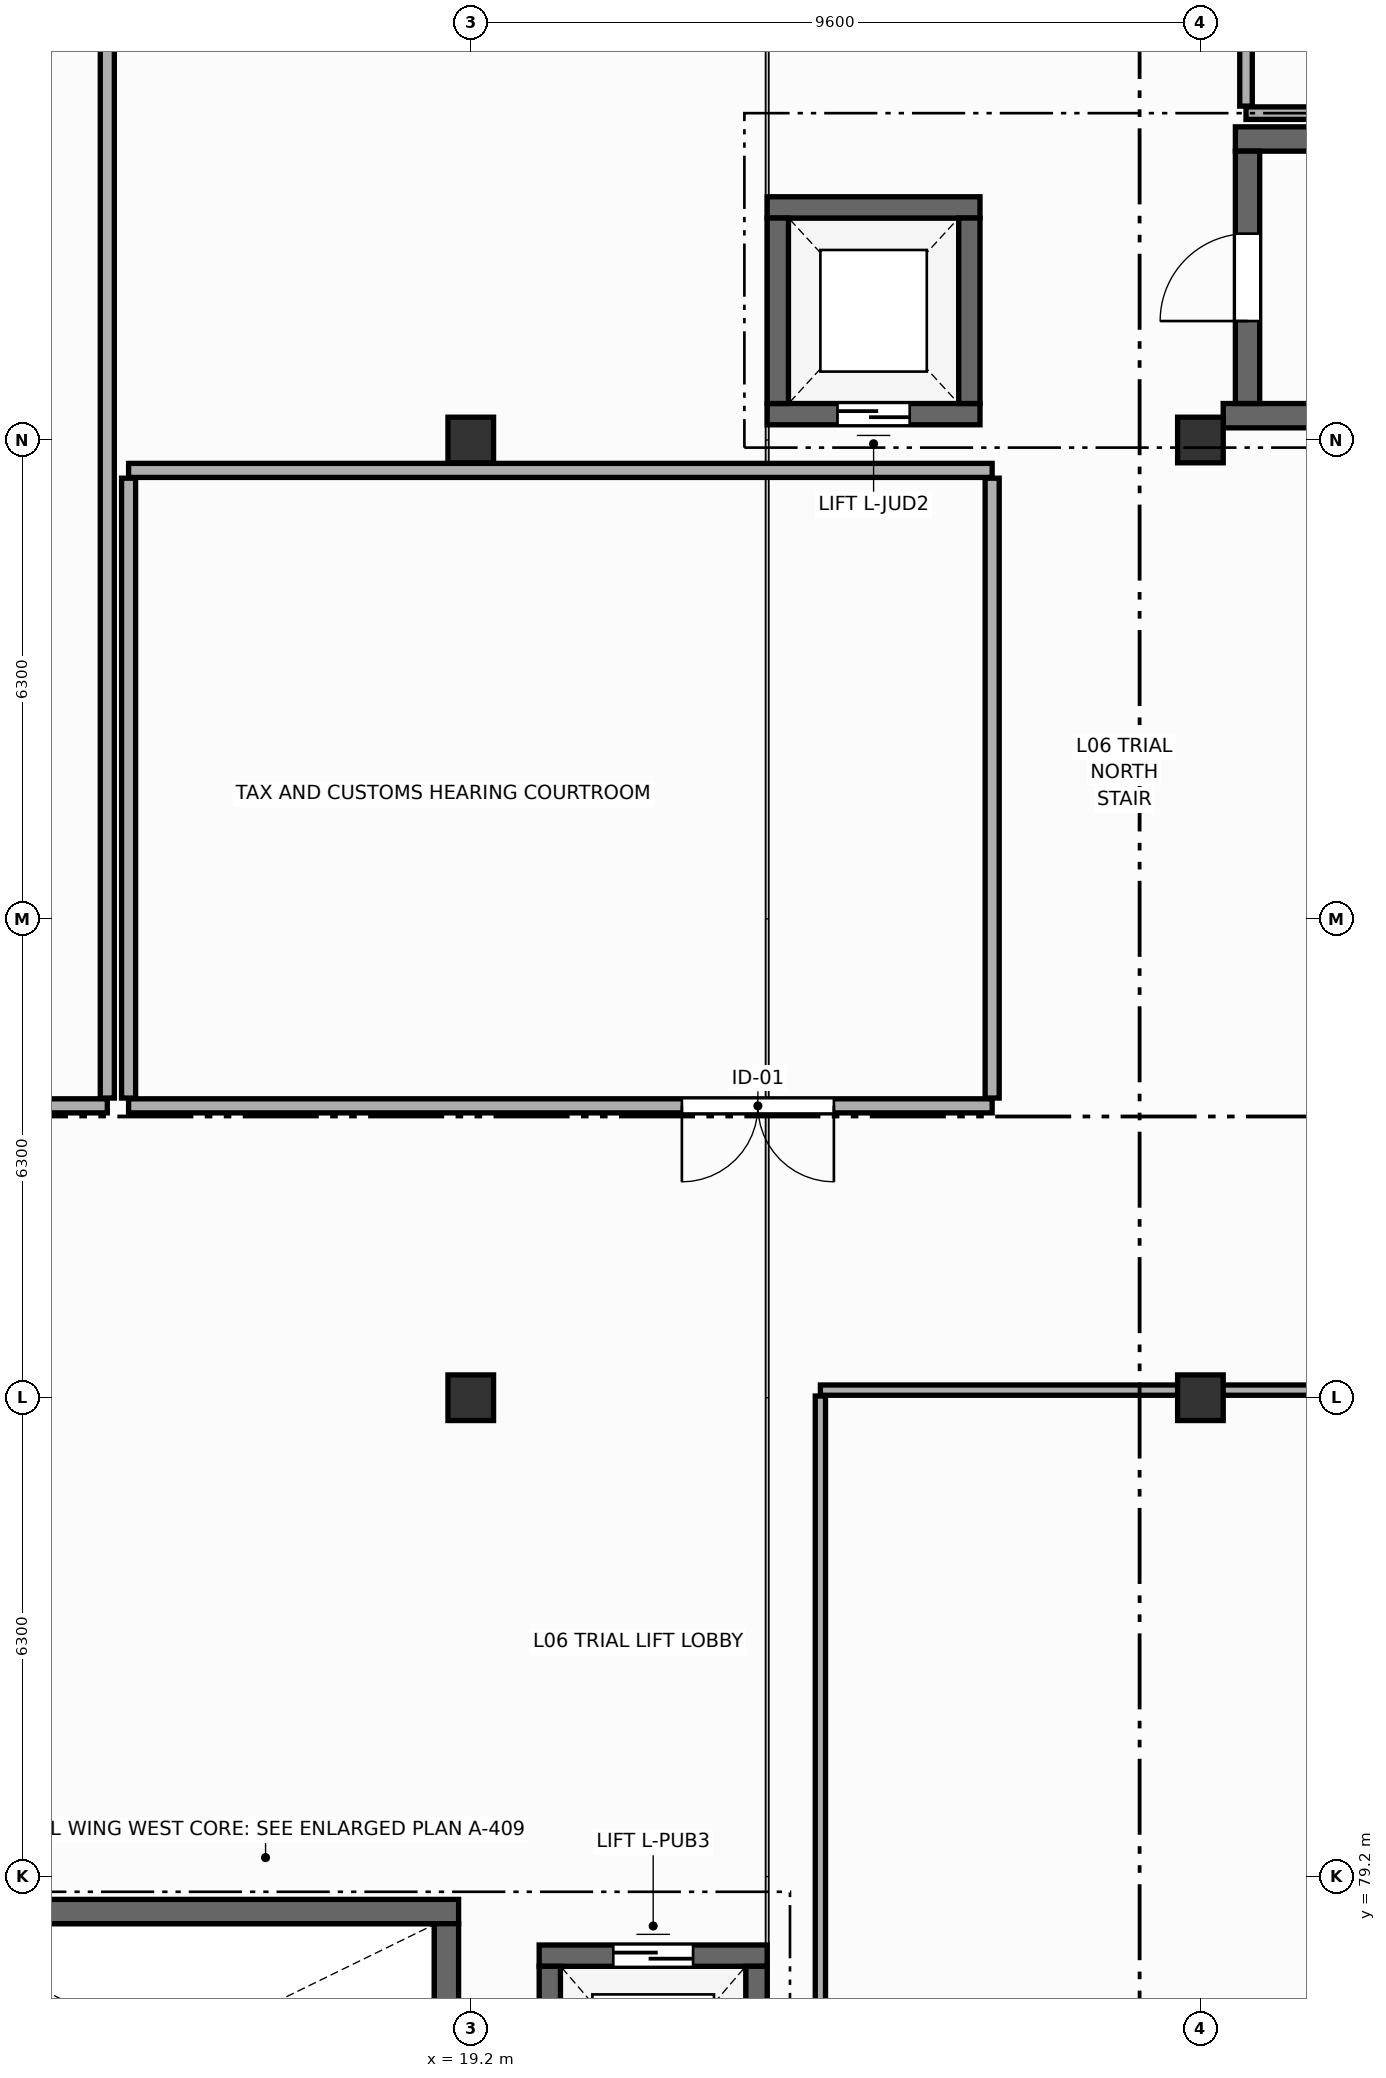
"""IFC4 building model, lengths in metres.
Left out: names, types, materials, properties, quantities, classifications, styles, units other than length and angle.
Written with IfcOpenShell. Run it as: python <this file> out.ifc"""

import sys

from ifc_helpers import new_model, si_unit, direction, frame, frame_2d, origin, origin_2d, place, context, subcontext, project, spatial, rectangle, extrude, element, fill, save


model = new_model("IFC4")
c1 = context("Model", 3, precision=1e-05, world=origin(), true_north=direction((0.0, 1.0)))
c2 = subcontext(c1, "Body", "Model", "MODEL_VIEW")
j1 = project(units=[si_unit("LENGTHUNIT", "METRE"), si_unit("PLANEANGLEUNIT", "RADIAN")], contexts=[c1])
p1 = place(None, origin())
s1 = spatial("IfcSite", under=j1, at=p1, CompositionType="ELEMENT")
p2 = place(p1, origin())
s2 = spatial("IfcBuilding", under=s1, at=p2, CompositionType="ELEMENT")
p3 = place(p2, frame((0.0, 0.0, 22.8)))
s3 = spatial("IfcBuildingStorey", under=s2, at=p3, CompositionType="ELEMENT", Elevation=22.8)
for number, where, z_axis, x_axis in (
    (1, (19.2, 85.5, 0.0), (0.0, 0.0, 1.0), (1.0, 0.0, 0.0)),
    (2, (19.2, 98.1, 0.0), (0.0, 0.0, 1.0), (1.0, 0.0, 0.0)),
    (3, (28.8, 85.5, 0.0), (0.0, 0.0, 1.0), (1.0, 0.0, 0.0)),
    (4, (28.8, 98.1, 0.0), (0.0, 0.0, 1.0), (1.0, 0.0, 0.0)),
):
    element("IfcColumn", number, at=place(p3, frame(where, z_axis=z_axis, x_axis=x_axis)), inside=s3, PredefinedType="COLUMN", context=c2, shape_type="SweptSolid", body=[
        extrude(rectangle(XDim=0.6, YDim=0.6, at=origin_2d()), origin(), (0.0, 0.0, 1.0), 4.2),
    ])
p4 = place(p3, frame((9.86, 78.74, 0.0), z_axis=(0.0, 0.0, 1.0), x_axis=(1.0, 0.0, 0.0)))
e5 = element("IfcWall", 5, at=p4, inside=s3, PredefinedType="SHEAR", context=c2, shape_type="SweptSolid", body=[
    extrude(rectangle(XDim=9.18, YDim=0.32, at=frame_2d((4.59, 0.0))), origin(), (0.0, 0.0, 1.0), 3.97),
])
p5 = place(p3, frame((18.88, 78.58, 0.0), z_axis=(0.0, 0.0, 1.0), x_axis=(0.0, -1.0, 0.0)))
e6 = element("IfcWall", 6, at=p5, inside=s3, PredefinedType="SHEAR", context=c2, shape_type="SweptSolid", body=[
    extrude(rectangle(XDim=3.4, YDim=0.32, at=frame_2d((1.7, 0.0))), origin(), (0.0, 0.0, 1.0), 3.97),
])
p6 = place(p3, frame((29.26, 102.06, 0.0), z_axis=(0.0, 0.0, 1.0), x_axis=(1.0, 0.0, 0.0)))
e7 = element("IfcWall", 7, at=p6, inside=s3, PredefinedType="SHEAR", context=c2, shape_type="SweptSolid", body=[
    extrude(rectangle(XDim=9.18, YDim=0.32, at=frame_2d((4.59, 0.0))), origin(), (0.0, 0.0, 1.0), 3.97),
])
p7 = place(p3, frame((38.44, 98.42, 0.0), z_axis=(0.0, 0.0, 1.0), x_axis=(-1.0, 0.0, 0.0)))
e8 = element("IfcWall", 8, at=p7, inside=s3, PredefinedType="SHEAR", context=c2, shape_type="SweptSolid", body=[
    extrude(rectangle(XDim=9.34, YDim=0.32, at=frame_2d((4.67, 0.0))), origin(), (0.0, 0.0, 1.0), 3.97),
])
p8 = place(p3, frame((29.42, 98.58, 0.0), z_axis=(0.0, 0.0, 1.0), x_axis=(0.0, 1.0, 0.0)))
e9 = element("IfcWall", 9, at=p8, inside=s3, PredefinedType="SHEAR", context=c2, shape_type="SweptSolid", body=[
    extrude(rectangle(XDim=3.32, YDim=0.32, at=frame_2d((1.66, 0.0))), origin(), (0.0, 0.0, 1.0), 3.97),
])
p9 = place(p8, frame((1.085, 0.0, 0.0)))
e10 = element("IfcOpeningElement", 10, at=p9, cuts=e9, PredefinedType="OPENING", context=c2, shape_type="SweptSolid", body=[
    extrude(rectangle(XDim=1.15, YDim=2.2, at=frame_2d((0.575, 1.1))), frame((0.0, 0.17, 0.0), z_axis=(0.0, -1.0, 0.0), x_axis=(1.0, 0.0, 0.0)), (0.0, 0.0, 1.0), 0.34),
])
p10 = place(p3, frame((20.1, 78.16, 0.0), z_axis=(0.0, 0.0, 1.0), x_axis=(1.0, 0.0, 0.0)))
e11 = element("IfcWall", 11, at=p10, inside=s3, PredefinedType="SHEAR", context=c2, shape_type="SweptSolid", body=[
    extrude(rectangle(XDim=3.0, YDim=0.28, at=frame_2d((1.5, 0.0))), origin(), (0.0, 0.0, 1.0), 3.97),
])
p11 = place(p10, frame((0.975, 0.0, 0.0)))
e12 = element("IfcOpeningElement", 12, at=p11, cuts=e11, PredefinedType="OPENING", context=c2, shape_type="SweptSolid", body=[
    extrude(rectangle(XDim=1.05, YDim=2.2, at=frame_2d((0.525, 1.1))), frame((0.0, 0.15, 0.0), z_axis=(0.0, -1.0, 0.0), x_axis=(1.0, 0.0, 0.0)), (0.0, 0.0, 1.0), 0.3),
])
for number, where, z_axis, x_axis in (
    (13, (20.24, 75.18, 0.0), (0.0, 0.0, 1.0), (0.0, 1.0, 0.0)),
    (14, (22.96, 78.02, 0.0), (0.0, 0.0, 1.0), (0.0, -1.0, 0.0)),
):
    element("IfcWall", number, at=place(p3, frame(where, z_axis=z_axis, x_axis=x_axis)), inside=s3, PredefinedType="SHEAR", context=c2, shape_type="SweptSolid", body=[
        extrude(rectangle(XDim=2.84, YDim=0.28, at=frame_2d((1.42, 0.0))), origin(), (0.0, 0.0, 1.0), 3.97),
    ])
p12 = place(p3, frame((23.1, 101.16, 0.0), z_axis=(0.0, 0.0, 1.0), x_axis=(1.0, 0.0, 0.0)))
e15 = element("IfcWall", 15, at=p12, inside=s3, PredefinedType="SHEAR", context=c2, shape_type="SweptSolid", body=[
    extrude(rectangle(XDim=2.8, YDim=0.28, at=frame_2d((1.4, 0.0))), origin(), (0.0, 0.0, 1.0), 3.97),
])
p13 = place(p3, frame((25.9, 98.44, 0.0), z_axis=(0.0, 0.0, 1.0), x_axis=(-1.0, 0.0, 0.0)))
e16 = element("IfcWall", 16, at=p13, inside=s3, PredefinedType="SHEAR", context=c2, shape_type="SweptSolid", body=[
    extrude(rectangle(XDim=2.8, YDim=0.28, at=frame_2d((1.4, 0.0))), origin(), (0.0, 0.0, 1.0), 3.97),
])
p14 = place(p13, frame((0.925, 0.0, 0.0)))
e17 = element("IfcOpeningElement", 17, at=p14, cuts=e16, PredefinedType="OPENING", context=c2, shape_type="SweptSolid", body=[
    extrude(rectangle(XDim=0.95, YDim=2.15, at=frame_2d((0.475, 1.075))), frame((0.0, 0.15, 0.0), z_axis=(0.0, -1.0, 0.0), x_axis=(1.0, 0.0, 0.0)), (0.0, 0.0, 1.0), 0.3),
])
for number, where, z_axis, x_axis in (
    (18, (23.24, 98.58, 0.0), (0.0, 0.0, 1.0), (0.0, 1.0, 0.0)),
    (19, (25.76, 101.02, 0.0), (0.0, 0.0, 1.0), (0.0, -1.0, 0.0)),
):
    element("IfcWall", number, at=place(p3, frame(where, z_axis=z_axis, x_axis=x_axis)), inside=s3, PredefinedType="SHEAR", context=c2, shape_type="SweptSolid", body=[
        extrude(rectangle(XDim=2.44, YDim=0.28, at=frame_2d((1.22, 0.0))), origin(), (0.0, 0.0, 1.0), 3.97),
    ])
p15 = place(p3, frame((14.418, 89.34, 0.0), z_axis=(0.0, 0.0, 1.0), x_axis=(-1.0, 0.0, 0.0)))
e20 = element("IfcWall", 20, at=p15, inside=s3, PredefinedType="PARTITIONING", context=c2, shape_type="SweptSolid", body=[
    extrude(rectangle(XDim=13.964, YDim=0.185, at=frame_2d((6.982, 0.0))), origin(), (0.0, 0.0, 1.0), 3.1),
])
p16 = place(p15, frame((2.04, 0.0, 0.0)))
e21 = element("IfcOpeningElement", 21, at=p16, cuts=e20, PredefinedType="OPENING", context=c2, shape_type="SweptSolid", body=[
    extrude(rectangle(XDim=2.0, YDim=2.5, at=frame_2d((1.0, 1.25))), frame((0.0, 0.103, 0.0), z_axis=(0.0, -1.0, 0.0), x_axis=(1.0, 0.0, 0.0)), (0.0, 0.0, 1.0), 0.205),
])
p17 = place(p3, frame((14.418, 112.346, 0.0), z_axis=(0.0, 0.0, 1.0), x_axis=(0.0, -1.0, 0.0)))
e22 = element("IfcWall", 22, at=p17, inside=s3, PredefinedType="PARTITIONING", context=c2, shape_type="SweptSolid", body=[
    extrude(rectangle(XDim=22.904, YDim=0.185, at=frame_2d((11.452, 0.0))), origin(), (0.0, 0.0, 1.0), 3.3),
])
p18 = place(p3, frame((14.698, 97.7, 0.0), z_axis=(0.0, 0.0, 1.0), x_axis=(1.0, 0.0, 0.0)))
e23 = element("IfcWall", 23, at=p18, inside=s3, PredefinedType="PARTITIONING", context=c2, shape_type="SweptSolid", body=[
    extrude(rectangle(XDim=11.362, YDim=0.185, at=frame_2d((5.681, 0.0))), origin(), (0.0, 0.0, 1.0), 3.05),
])
p19 = place(p3, frame((26.06, 89.34, 0.0), z_axis=(0.0, 0.0, 1.0), x_axis=(-1.0, 0.0, 0.0)))
e24 = element("IfcWall", 24, at=p19, inside=s3, PredefinedType="PARTITIONING", context=c2, shape_type="SweptSolid", body=[
    extrude(rectangle(XDim=11.362, YDim=0.185, at=frame_2d((5.681, 0.0))), origin(), (0.0, 0.0, 1.0), 3.1),
])
p20 = place(p19, frame((2.083, 0.0, 0.0)))
e25 = element("IfcOpeningElement", 25, at=p20, cuts=e24, PredefinedType="OPENING", context=c2, shape_type="SweptSolid", body=[
    extrude(rectangle(XDim=2.0, YDim=2.5, at=frame_2d((1.0, 1.25))), frame((0.0, 0.103, 0.0), z_axis=(0.0, -1.0, 0.0), x_axis=(1.0, 0.0, 0.0)), (0.0, 0.0, 1.0), 0.205),
])
for number, where, z_axis, x_axis in (
    (26, (14.698, 89.442, 0.0), (0.0, 0.0, 1.0), (0.0, 1.0, 0.0)),
    (27, (26.06, 97.597, 0.0), (0.0, 0.0, 1.0), (0.0, -1.0, 0.0)),
):
    element("IfcWall", number, at=place(p3, frame(where, z_axis=z_axis, x_axis=x_axis)), inside=s3, PredefinedType="PARTITIONING", context=c2, shape_type="SweptSolid", body=[
        extrude(rectangle(XDim=8.155, YDim=0.185, at=frame_2d((4.078, 0.0))), origin(), (0.0, 0.0, 1.0), 3.35),
    ])
p21 = place(p3, frame((45.6, 102.4, 0.0), z_axis=(0.0, 0.0, 1.0), x_axis=(-1.0, 0.0, 0.0)))
e28 = element("IfcWall", 28, at=p21, inside=s3, PredefinedType="PARTITIONING", context=c2, shape_type="SweptSolid", body=[
    extrude(rectangle(XDim=16.2, YDim=0.165, at=frame_2d((8.1, 0.0))), origin(), (0.0, 0.0, 1.0), 3.05),
])
p22 = place(p3, frame((29.4, 102.492, 0.0), z_axis=(0.0, 0.0, 1.0), x_axis=(0.0, 1.0, 0.0)))
e29 = element("IfcWall", 29, at=p22, inside=s3, PredefinedType="PARTITIONING", context=c2, shape_type="SweptSolid", body=[
    extrude(rectangle(XDim=9.854, YDim=0.165, at=frame_2d((4.927, 0.0))), origin(), (0.0, 0.0, 1.0), 3.35),
])
p23 = place(p22, frame((1.985, 0.0, 0.0)))
e30 = element("IfcOpeningElement", 30, at=p23, cuts=e29, PredefinedType="OPENING", context=c2, shape_type="SweptSolid", body=[
    extrude(rectangle(XDim=0.98, YDim=2.2, at=frame_2d((0.49, 1.1))), frame((0.0, 0.093, 0.0), z_axis=(0.0, -1.0, 0.0), x_axis=(1.0, 0.0, 0.0)), (0.0, 0.0, 1.0), 0.185),
])
p24 = place(p3, frame((23.8, 85.6, 0.0), z_axis=(0.0, 0.0, 1.0), x_axis=(1.0, 0.0, 0.0)))
e31 = element("IfcWall", 31, at=p24, inside=s3, PredefinedType="PARTITIONING", context=c2, shape_type="SweptSolid", body=[
    extrude(rectangle(XDim=21.8, YDim=0.135, at=frame_2d((10.9, 0.0))), origin(), (0.0, 0.0, 1.0), 3.075),
])
p25 = place(p24, frame((8.41, 0.0, 0.0)))
e32 = element("IfcOpeningElement", 32, at=p25, cuts=e31, PredefinedType="OPENING", context=c2, shape_type="SweptSolid", body=[
    extrude(rectangle(XDim=0.95, YDim=2.15, at=frame_2d((0.475, 1.075))), frame((0.0, 0.077, 0.0), z_axis=(0.0, -1.0, 0.0), x_axis=(1.0, 0.0, 0.0)), (0.0, 0.0, 1.0), 0.155),
])
p26 = place(p3, frame((23.8, 72.31, 0.0), z_axis=(0.0, 0.0, 1.0), x_axis=(0.0, 1.0, 0.0)))
e33 = element("IfcWall", 33, at=p26, inside=s3, PredefinedType="PARTITIONING", context=c2, shape_type="SweptSolid", body=[
    extrude(rectangle(XDim=13.212, YDim=0.135, at=frame_2d((6.606, 0.0))), origin(), (0.0, 0.0, 1.0), 3.3),
])
p27 = place(p9, origin())
e34 = element("IfcDoor", 34, at=p27, inside=s3, OperationType="SINGLE_SWING_LEFT", PredefinedType="DOOR", context=c2, shape_type="SweptSolid", body=[
    extrude(rectangle(XDim=1.15, YDim=2.2, at=frame_2d((0.575, 1.1))), frame((0.0, 0.025, 0.0), z_axis=(0.0, -1.0, 0.0), x_axis=(1.0, 0.0, 0.0)), (0.0, 0.0, 1.0), 0.05),
])
fill(e10, e34)
p28 = place(p11, origin())
e35 = element("IfcDoor", 35, at=p28, inside=s3, OperationType="DOUBLE_DOOR_SLIDING", PredefinedType="DOOR", context=c2, shape_type="SweptSolid", body=[
    extrude(rectangle(XDim=1.05, YDim=2.2, at=frame_2d((0.525, 1.1))), frame((0.0, 0.025, 0.0), z_axis=(0.0, -1.0, 0.0), x_axis=(1.0, 0.0, 0.0)), (0.0, 0.0, 1.0), 0.05),
])
fill(e12, e35)
p29 = place(p14, origin())
e36 = element("IfcDoor", 36, at=p29, inside=s3, OperationType="DOUBLE_DOOR_SLIDING", PredefinedType="DOOR", context=c2, shape_type="SweptSolid", body=[
    extrude(rectangle(XDim=0.95, YDim=2.15, at=frame_2d((0.475, 1.075))), frame((0.0, 0.025, 0.0), z_axis=(0.0, -1.0, 0.0), x_axis=(1.0, 0.0, 0.0)), (0.0, 0.0, 1.0), 0.05),
])
fill(e17, e36)
p30 = place(p20, origin())
e37 = element("IfcDoor", 37, at=p30, inside=s3, OperationType="DOUBLE_DOOR_SINGLE_SWING", PredefinedType="DOOR", context=c2, shape_type="SweptSolid", body=[
    extrude(rectangle(XDim=2.0, YDim=2.5, at=frame_2d((1.0, 1.25))), frame((0.0, 0.025, 0.0), z_axis=(0.0, -1.0, 0.0), x_axis=(1.0, 0.0, 0.0)), (0.0, 0.0, 1.0), 0.05),
])
fill(e25, e37)
save(model, sys.argv[1])
